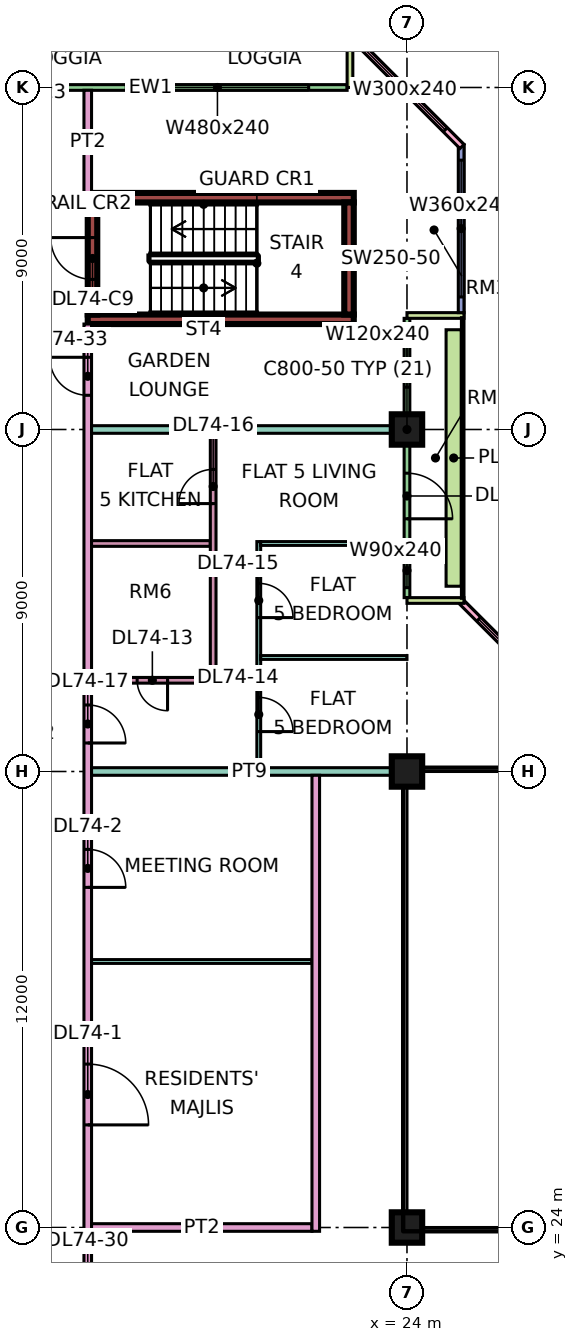
"""IFC4 building model, lengths in metres.
Left out: names, types, materials, properties, quantities, classifications, styles, units other than length and angle.
Written with IfcOpenShell. Run it as: python <this file> out.ifc"""

import sys

from ifc_helpers import new_model, si_unit, direction, frame, frame_2d, origin, origin_2d, place, context, subcontext, project, spatial, rectangle, extrude, element, fill, save


model = new_model("IFC4")
c1 = context("Model", 3, precision=1e-05, world=origin(), true_north=direction((0.0, 1.0)))
c2 = subcontext(c1, "Body", "Model", "MODEL_VIEW")
j1 = project(units=[si_unit("LENGTHUNIT", "METRE"), si_unit("PLANEANGLEUNIT", "RADIAN")], contexts=[c1])
p1 = place(None, origin())
s1 = spatial("IfcSite", under=j1, at=p1, CompositionType="ELEMENT")
p2 = place(p1, origin())
s2 = spatial("IfcBuilding", under=s1, at=p2, CompositionType="ELEMENT")
p3 = place(p2, frame((0.0, 0.0, 314.65)))
s3 = spatial("IfcBuildingStorey", under=s2, at=p3, CompositionType="ELEMENT", Elevation=314.65)
for number, where, z_axis, x_axis in (
    (1, (24.0, 24.0, 0.0), (0.0, 0.0, 1.0), (1.0, 0.0, 0.0)),
    (2, (24.0, 36.0, 0.0), (0.0, 0.0, 1.0), (1.0, 0.0, 0.0)),
    (3, (24.0, 45.0, 0.0), (0.0, 0.0, 1.0), (1.0, 0.0, 0.0)),
):
    element("IfcColumn", number, at=place(p3, frame(where, z_axis=z_axis, x_axis=x_axis)), inside=s3, PredefinedType="COLUMN", context=c2, shape_type="SweptSolid", body=[
        extrude(rectangle(XDim=0.8, YDim=0.8, at=origin_2d()), origin(), (0.0, 0.0, 1.0), 3.75),
    ])
for number, where, z_axis, x_axis in (
    (4, (15.6, 47.9, 0.0), (0.0, 0.0, 1.0), (1.0, 0.0, 0.0)),
    (5, (15.6, 51.1, 0.0), (0.0, 0.0, 1.0), (1.0, 0.0, 0.0)),
):
    element("IfcWall", number, at=place(p3, frame(where, z_axis=z_axis, x_axis=x_axis)), inside=s3, PredefinedType="SHEAR", context=c2, shape_type="SweptSolid", body=[
        extrude(rectangle(XDim=7.0, YDim=0.25, at=frame_2d((3.5, 0.0))), origin(), (0.0, 0.0, 1.0), 3.75),
    ])
p4 = place(p3, frame((15.725, 48.025, 0.0), z_axis=(0.0, 0.0, 1.0), x_axis=(0.0, 1.0, 0.0)))
e6 = element("IfcWall", 6, at=p4, inside=s3, PredefinedType="SHEAR", context=c2, shape_type="SweptSolid", body=[
    extrude(rectangle(XDim=2.95, YDim=0.25, at=frame_2d((1.475, 0.0))), origin(), (0.0, 0.0, 1.0), 3.75),
])
p5 = place(p4, frame((0.925, 0.0, 0.0)))
e7 = element("IfcOpeningElement", 7, at=p5, cuts=e6, PredefinedType="OPENING", context=c2, shape_type="SweptSolid", body=[
    extrude(rectangle(XDim=1.1, YDim=2.2, at=frame_2d((0.55, 1.1))), frame((0.0, 0.135, 0.0), z_axis=(0.0, -1.0, 0.0), x_axis=(1.0, 0.0, 0.0)), (0.0, 0.0, 1.0), 0.27),
])
p6 = place(p3, frame((22.475, 48.025, 0.0), z_axis=(0.0, 0.0, 1.0), x_axis=(0.0, 1.0, 0.0)))
e8 = element("IfcWall", 8, at=p6, inside=s3, PredefinedType="SHEAR", context=c2, shape_type="SweptSolid", body=[
    extrude(rectangle(XDim=2.95, YDim=0.25, at=frame_2d((1.475, 0.0))), origin(), (0.0, 0.0, 1.0), 3.75),
])
p7 = place(p3, frame((28.447, 37.447, 0.0), z_axis=(0.0, 0.0, 1.0), x_axis=(-0.707106781187, 0.707106781187, 0.0)))
e9 = element("IfcWall", 9, at=p7, inside=s3, PredefinedType="SOLIDWALL", context=c2, shape_type="SweptSolid", body=[
    extrude(rectangle(XDim=4.243, YDim=0.15, at=frame_2d((2.121, 0.0))), origin(), (0.0, 0.0, 1.0), 3.35),
])
p8 = place(p7, frame((0.621, 0.0, 0.45)))
e10 = element("IfcOpeningElement", 10, at=p8, cuts=e9, PredefinedType="OPENING", context=c2, shape_type="SweptSolid", body=[
    extrude(rectangle(XDim=3.0, YDim=2.4, at=frame_2d((1.5, 1.2))), frame((0.0, 0.085, 0.0), z_axis=(0.0, -1.0, 0.0), x_axis=(1.0, 0.0, 0.0)), (0.0, 0.0, 1.0), 0.17),
])
p9 = place(p3, frame((24.0, 40.575, 0.0), z_axis=(0.0, 0.0, 1.0), x_axis=(0.0, 1.0, 0.0)))
e11 = element("IfcWall", 11, at=p9, inside=s3, PredefinedType="SOLIDWALL", context=c2, shape_type="SweptSolid", body=[
    extrude(rectangle(XDim=7.35, YDim=0.15, at=frame_2d((3.675, 0.0))), origin(), (0.0, 0.0, 1.0), 3.35),
])
p10 = place(p9, frame((0.262, 0.0, 0.45)))
e12 = element("IfcOpeningElement", 12, at=p10, cuts=e11, PredefinedType="OPENING", context=c2, shape_type="SweptSolid", body=[
    extrude(rectangle(XDim=0.9, YDim=2.4, at=frame_2d((0.45, 1.2))), frame((0.0, 0.085, 0.0), z_axis=(0.0, -1.0, 0.0), x_axis=(1.0, 0.0, 0.0)), (0.0, 0.0, 1.0), 0.17),
])
p11 = place(p9, frame((2.075, 0.0, 0.0)))
e13 = element("IfcOpeningElement", 13, at=p11, cuts=e11, PredefinedType="OPENING", context=c2, shape_type="SweptSolid", body=[
    extrude(rectangle(XDim=1.2, YDim=2.4, at=frame_2d((0.6, 1.2))), frame((0.0, 0.085, 0.0), z_axis=(0.0, -1.0, 0.0), x_axis=(1.0, 0.0, 0.0)), (0.0, 0.0, 1.0), 0.17),
])
p12 = place(p9, frame((5.538, 0.0, 0.45)))
e14 = element("IfcOpeningElement", 14, at=p12, cuts=e11, PredefinedType="OPENING", context=c2, shape_type="SweptSolid", body=[
    extrude(rectangle(XDim=1.2, YDim=2.4, at=frame_2d((0.6, 1.2))), frame((0.0, 0.085, 0.0), z_axis=(0.0, -1.0, 0.0), x_axis=(1.0, 0.0, 0.0)), (0.0, 0.0, 1.0), 0.17),
])
for number, where, z_axis, x_axis in (
    (15, (25.5, 40.5, 0.0), (0.0, 0.0, 1.0), (-1.0, 0.0, 0.0)),
    (16, (25.5, 48.0, 0.0), (0.0, 0.0, 1.0), (-1.0, 0.0, 0.0)),
):
    element("IfcWall", number, at=place(p3, frame(where, z_axis=z_axis, x_axis=x_axis)), inside=s3, PredefinedType="SOLIDWALL", context=c2, shape_type="SweptSolid", body=[
        extrude(rectangle(XDim=1.5, YDim=0.15, at=frame_2d((0.75, 0.0))), origin(), (0.0, 0.0, 1.0), 3.35),
    ])
p13 = place(p3, frame((25.425, 48.075, 0.0), z_axis=(0.0, 0.0, 1.0), x_axis=(0.0, 1.0, 0.0)))
e17 = element("IfcWall", 17, at=p13, inside=s3, PredefinedType="SOLIDWALL", context=c2, shape_type="SweptSolid", body=[
    extrude(rectangle(XDim=4.425, YDim=0.15, at=frame_2d((2.212, 0.0))), origin(), (0.0, 0.0, 1.0), 3.35),
])
p14 = place(p13, frame((0.413, 0.0, 0.45)))
e18 = element("IfcOpeningElement", 18, at=p14, cuts=e17, PredefinedType="OPENING", context=c2, shape_type="SweptSolid", body=[
    extrude(rectangle(XDim=3.6, YDim=2.4, at=frame_2d((1.8, 1.2))), frame((0.0, 0.085, 0.0), z_axis=(0.0, -1.0, 0.0), x_axis=(1.0, 0.0, 0.0)), (0.0, 0.0, 1.0), 0.17),
])
p15 = place(p3, frame((25.447, 52.447, 0.0), z_axis=(0.0, 0.0, 1.0), x_axis=(-0.707106781187, 0.707106781187, 0.0)))
e19 = element("IfcWall", 19, at=p15, inside=s3, PredefinedType="SOLIDWALL", context=c2, shape_type="SweptSolid", body=[
    extrude(rectangle(XDim=4.243, YDim=0.15, at=frame_2d((2.121, 0.0))), origin(), (0.0, 0.0, 1.0), 3.35),
])
p16 = place(p15, frame((0.621, 0.0, 0.45)))
e20 = element("IfcOpeningElement", 20, at=p16, cuts=e19, PredefinedType="OPENING", context=c2, shape_type="SweptSolid", body=[
    extrude(rectangle(XDim=3.0, YDim=2.4, at=frame_2d((1.5, 1.2))), frame((0.0, 0.085, 0.0), z_axis=(0.0, -1.0, 0.0), x_axis=(1.0, 0.0, 0.0)), (0.0, 0.0, 1.0), 0.17),
])
p17 = place(p3, frame((22.425, 54.0, 0.0), z_axis=(0.0, 0.0, 1.0), x_axis=(-1.0, 0.0, 0.0)))
e21 = element("IfcWall", 21, at=p17, inside=s3, PredefinedType="SOLIDWALL", context=c2, shape_type="SweptSolid", body=[
    extrude(rectangle(XDim=10.35, YDim=0.15, at=frame_2d((5.175, 0.0))), origin(), (0.0, 0.0, 1.0), 3.35),
])
p18 = place(p17, frame((1.012, 0.0, 0.45)))
e22 = element("IfcOpeningElement", 22, at=p18, cuts=e21, PredefinedType="OPENING", context=c2, shape_type="SweptSolid", body=[
    extrude(rectangle(XDim=4.8, YDim=2.4, at=frame_2d((2.4, 1.2))), frame((0.0, 0.085, 0.0), z_axis=(0.0, -1.0, 0.0), x_axis=(1.0, 0.0, 0.0)), (0.0, 0.0, 1.0), 0.17),
])
p19 = place(p3, frame((22.5, 55.5, 0.0), z_axis=(0.0, 0.0, 1.0), x_axis=(0.0, -1.0, 0.0)))
e23 = element("IfcWall", 23, at=p19, inside=s3, PredefinedType="SOLIDWALL", context=c2, shape_type="SweptSolid", body=[
    extrude(rectangle(XDim=1.5, YDim=0.15, at=frame_2d((0.75, 0.0))), origin(), (0.0, 0.0, 1.0), 3.35),
])
p20 = place(p3, frame((25.229, 40.875, 0.0), z_axis=(0.0, 0.0, 1.0), x_axis=(0.0, 1.0, 0.0)))
e24 = element("IfcWall", 24, at=p20, inside=s3, PredefinedType="SOLIDWALL", context=c2, shape_type="SweptSolid", body=[
    extrude(rectangle(XDim=6.75, YDim=0.4, at=frame_2d((3.375, 0.0))), origin(), (0.0, 0.0, 1.0), 0.7),
])
p21 = place(p3, frame((15.6, 20.0, 0.0), z_axis=(0.0, 0.0, 1.0), x_axis=(0.0, 1.0, 0.0)))
e25 = element("IfcWall", 25, at=p21, inside=s3, PredefinedType="PARTITIONING", context=c2, shape_type="SweptSolid", body=[
    extrude(rectangle(XDim=27.775, YDim=0.2, at=frame_2d((13.887, 0.0))), origin(), (0.0, 0.0, 1.0), 3.35),
])
p22 = place(p21, frame((6.7, 0.0, 0.0)))
e26 = element("IfcOpeningElement", 26, at=p22, cuts=e25, PredefinedType="OPENING", context=c2, shape_type="SweptSolid", body=[
    extrude(rectangle(XDim=1.6, YDim=2.1, at=frame_2d((0.8, 1.05))), frame((0.0, 0.11, 0.0), z_axis=(0.0, -1.0, 0.0), x_axis=(1.0, 0.0, 0.0)), (0.0, 0.0, 1.0), 0.22),
])
p23 = place(p21, frame((12.95, 0.0, 0.0)))
e27 = element("IfcOpeningElement", 27, at=p23, cuts=e25, PredefinedType="OPENING", context=c2, shape_type="SweptSolid", body=[
    extrude(rectangle(XDim=1.0, YDim=2.1, at=frame_2d((0.5, 1.05))), frame((0.0, 0.11, 0.0), z_axis=(0.0, -1.0, 0.0), x_axis=(1.0, 0.0, 0.0)), (0.0, 0.0, 1.0), 0.22),
])
p24 = place(p21, frame((16.75, 0.0, 0.0)))
e28 = element("IfcOpeningElement", 28, at=p24, cuts=e25, PredefinedType="OPENING", context=c2, shape_type="SweptSolid", body=[
    extrude(rectangle(XDim=1.0, YDim=2.1, at=frame_2d((0.5, 1.05))), frame((0.0, 0.11, 0.0), z_axis=(0.0, -1.0, 0.0), x_axis=(1.0, 0.0, 0.0)), (0.0, 0.0, 1.0), 0.22),
])
p25 = place(p21, frame((1.15, 0.0, 0.0)))
e29 = element("IfcOpeningElement", 29, at=p25, cuts=e25, PredefinedType="OPENING", context=c2, shape_type="SweptSolid", body=[
    extrude(rectangle(XDim=1.8, YDim=2.1, at=frame_2d((0.9, 1.05))), frame((0.0, 0.11, 0.0), z_axis=(0.0, -1.0, 0.0), x_axis=(1.0, 0.0, 0.0)), (0.0, 0.0, 1.0), 0.22),
])
p26 = place(p21, frame((25.9, 0.0, 0.0)))
e30 = element("IfcOpeningElement", 30, at=p26, cuts=e25, PredefinedType="OPENING", context=c2, shape_type="SweptSolid", body=[
    extrude(rectangle(XDim=1.0, YDim=2.1, at=frame_2d((0.5, 1.05))), frame((0.0, 0.11, 0.0), z_axis=(0.0, -1.0, 0.0), x_axis=(1.0, 0.0, 0.0)), (0.0, 0.0, 1.0), 0.22),
])
p27 = place(p3, frame((15.6, 51.225, 0.0), z_axis=(0.0, 0.0, 1.0), x_axis=(0.0, 1.0, 0.0)))
e31 = element("IfcWall", 31, at=p27, inside=s3, PredefinedType="PARTITIONING", context=c2, shape_type="SweptSolid", body=[
    extrude(rectangle(XDim=2.701, YDim=0.2, at=frame_2d((1.351, 0.0))), origin(), (0.0, 0.0, 1.0), 3.35),
])
p28 = place(p3, frame((15.7, 24.0, 0.0), z_axis=(0.0, 0.0, 1.0), x_axis=(1.0, 0.0, 0.0)))
e32 = element("IfcWall", 32, at=p28, inside=s3, PredefinedType="PARTITIONING", context=c2, shape_type="SweptSolid", body=[
    extrude(rectangle(XDim=5.8, YDim=0.2, at=frame_2d((2.9, 0.0))), origin(), (0.0, 0.0, 1.0), 3.35),
])
p29 = place(p3, frame((15.7, 31.0, 0.0), z_axis=(0.0, 0.0, 1.0), x_axis=(1.0, 0.0, 0.0)))
e33 = element("IfcWall", 33, at=p29, inside=s3, PredefinedType="PARTITIONING", context=c2, shape_type="SweptSolid", body=[
    extrude(rectangle(XDim=5.8, YDim=0.1, at=frame_2d((2.9, 0.0))), origin(), (0.0, 0.0, 1.0), 3.35),
])
p30 = place(p3, frame((15.7, 36.0, 0.0), z_axis=(0.0, 0.0, 1.0), x_axis=(1.0, 0.0, 0.0)))
e34 = element("IfcWall", 34, at=p30, inside=s3, PredefinedType="PARTITIONING", context=c2, shape_type="SweptSolid", body=[
    extrude(rectangle(XDim=8.3, YDim=0.2, at=frame_2d((4.15, 0.0))), origin(), (0.0, 0.0, 1.0), 3.35),
])
p31 = place(p3, frame((15.7, 38.4, 0.0), z_axis=(0.0, 0.0, 1.0), x_axis=(1.0, 0.0, 0.0)))
e35 = element("IfcWall", 35, at=p31, inside=s3, PredefinedType="PARTITIONING", context=c2, shape_type="SweptSolid", body=[
    extrude(rectangle(XDim=3.125, YDim=0.15, at=frame_2d((1.562, 0.0))), origin(), (0.0, 0.0, 1.0), 3.35),
])
p32 = place(p31, frame((1.2, 0.0, 0.0)))
e36 = element("IfcOpeningElement", 36, at=p32, cuts=e35, PredefinedType="OPENING", context=c2, shape_type="SweptSolid", body=[
    extrude(rectangle(XDim=0.8, YDim=2.1, at=frame_2d((0.4, 1.05))), frame((0.0, 0.085, 0.0), z_axis=(0.0, -1.0, 0.0), x_axis=(1.0, 0.0, 0.0)), (0.0, 0.0, 1.0), 0.17),
])
p33 = place(p3, frame((15.7, 42.0, 0.0), z_axis=(0.0, 0.0, 1.0), x_axis=(1.0, 0.0, 0.0)))
e37 = element("IfcWall", 37, at=p33, inside=s3, PredefinedType="PARTITIONING", context=c2, shape_type="SweptSolid", body=[
    extrude(rectangle(XDim=3.125, YDim=0.15, at=frame_2d((1.562, 0.0))), origin(), (0.0, 0.0, 1.0), 3.35),
])
p34 = place(p3, frame((15.7, 45.0, 0.0), z_axis=(0.0, 0.0, 1.0), x_axis=(1.0, 0.0, 0.0)))
e38 = element("IfcWall", 38, at=p34, inside=s3, PredefinedType="PARTITIONING", context=c2, shape_type="SweptSolid", body=[
    extrude(rectangle(XDim=8.226, YDim=0.2, at=frame_2d((4.113, 0.0))), origin(), (0.0, 0.0, 1.0), 3.35),
])
p35 = place(p3, frame((18.9, 38.325, 0.0), z_axis=(0.0, 0.0, 1.0), x_axis=(0.0, 1.0, 0.0)))
e39 = element("IfcWall", 39, at=p35, inside=s3, PredefinedType="PARTITIONING", context=c2, shape_type="SweptSolid", body=[
    extrude(rectangle(XDim=6.575, YDim=0.15, at=frame_2d((3.288, 0.0))), origin(), (0.0, 0.0, 1.0), 3.35),
])
p36 = place(p35, frame((4.725, 0.0, 0.0)))
e40 = element("IfcOpeningElement", 40, at=p36, cuts=e39, PredefinedType="OPENING", context=c2, shape_type="SweptSolid", body=[
    extrude(rectangle(XDim=0.9, YDim=2.1, at=frame_2d((0.45, 1.05))), frame((0.0, 0.085, 0.0), z_axis=(0.0, -1.0, 0.0), x_axis=(1.0, 0.0, 0.0)), (0.0, 0.0, 1.0), 0.17),
])
p37 = place(p3, frame((20.1, 36.1, 0.0), z_axis=(0.0, 0.0, 1.0), x_axis=(0.0, 1.0, 0.0)))
e41 = element("IfcWall", 41, at=p37, inside=s3, PredefinedType="PARTITIONING", context=c2, shape_type="SweptSolid", body=[
    extrude(rectangle(XDim=5.95, YDim=0.1, at=frame_2d((2.975, 0.0))), origin(), (0.0, 0.0, 1.0), 3.35),
])
p38 = place(p37, frame((0.95, 0.0, 0.0)))
e42 = element("IfcOpeningElement", 42, at=p38, cuts=e41, PredefinedType="OPENING", context=c2, shape_type="SweptSolid", body=[
    extrude(rectangle(XDim=0.9, YDim=2.1, at=frame_2d((0.45, 1.05))), frame((0.0, 0.06, 0.0), z_axis=(0.0, -1.0, 0.0), x_axis=(1.0, 0.0, 0.0)), (0.0, 0.0, 1.0), 0.12),
])
p39 = place(p37, frame((3.95, 0.0, 0.0)))
e43 = element("IfcOpeningElement", 43, at=p39, cuts=e41, PredefinedType="OPENING", context=c2, shape_type="SweptSolid", body=[
    extrude(rectangle(XDim=0.9, YDim=2.1, at=frame_2d((0.45, 1.05))), frame((0.0, 0.06, 0.0), z_axis=(0.0, -1.0, 0.0), x_axis=(1.0, 0.0, 0.0)), (0.0, 0.0, 1.0), 0.12),
])
p40 = place(p3, frame((20.15, 39.0, 0.0), z_axis=(0.0, 0.0, 1.0), x_axis=(1.0, 0.0, 0.0)))
e44 = element("IfcWall", 44, at=p40, inside=s3, PredefinedType="PARTITIONING", context=c2, shape_type="SweptSolid", body=[
    extrude(rectangle(XDim=3.85, YDim=0.1, at=frame_2d((1.925, 0.0))), origin(), (0.0, 0.0, 1.0), 3.35),
])
p41 = place(p3, frame((20.15, 42.0, 0.0), z_axis=(0.0, 0.0, 1.0), x_axis=(1.0, 0.0, 0.0)))
e45 = element("IfcWall", 45, at=p41, inside=s3, PredefinedType="PARTITIONING", context=c2, shape_type="SweptSolid", body=[
    extrude(rectangle(XDim=3.776, YDim=0.1, at=frame_2d((1.888, 0.0))), origin(), (0.0, 0.0, 1.0), 3.35),
])
p42 = place(p3, frame((21.6, 23.9, 0.0), z_axis=(0.0, 0.0, 1.0), x_axis=(0.0, 1.0, 0.0)))
e46 = element("IfcWall", 46, at=p42, inside=s3, PredefinedType="PARTITIONING", context=c2, shape_type="SweptSolid", body=[
    extrude(rectangle(XDim=12.0, YDim=0.2, at=frame_2d((6.0, 0.0))), origin(), (0.0, 0.0, 1.0), 3.35),
])
p43 = place(p8, origin())
e47 = element("IfcWindow", 47, at=p43, inside=s3, PartitioningType="SINGLE_PANEL", PredefinedType="WINDOW", context=c2, shape_type="SweptSolid", body=[
    extrude(rectangle(XDim=3.0, YDim=2.4, at=frame_2d((1.5, 1.2))), frame((0.0, 0.03, 0.0), z_axis=(0.0, -1.0, 0.0), x_axis=(1.0, 0.0, 0.0)), (0.0, 0.0, 1.0), 0.06),
])
fill(e10, e47)
p44 = place(p10, origin())
e48 = element("IfcWindow", 48, at=p44, inside=s3, PartitioningType="SINGLE_PANEL", PredefinedType="WINDOW", context=c2, shape_type="SweptSolid", body=[
    extrude(rectangle(XDim=0.9, YDim=2.4, at=frame_2d((0.45, 1.2))), frame((0.0, 0.03, 0.0), z_axis=(0.0, -1.0, 0.0), x_axis=(1.0, 0.0, 0.0)), (0.0, 0.0, 1.0), 0.06),
])
fill(e12, e48)
p45 = place(p11, frame((1.2, 0.0, 0.0), z_axis=(0.0, 0.0, 1.0), x_axis=(-1.0, 0.0, 0.0)))
e49 = element("IfcDoor", 49, at=p45, inside=s3, OperationType="DOUBLE_DOOR_SINGLE_SWING", PredefinedType="DOOR", context=c2, shape_type="SweptSolid", body=[
    extrude(rectangle(XDim=1.2, YDim=2.4, at=frame_2d((0.6, 1.2))), frame((0.0, 0.025, 0.0), z_axis=(0.0, -1.0, 0.0), x_axis=(1.0, 0.0, 0.0)), (0.0, 0.0, 1.0), 0.05),
])
fill(e13, e49)
p46 = place(p12, origin())
e50 = element("IfcWindow", 50, at=p46, inside=s3, PartitioningType="SINGLE_PANEL", PredefinedType="WINDOW", context=c2, shape_type="SweptSolid", body=[
    extrude(rectangle(XDim=1.2, YDim=2.4, at=frame_2d((0.6, 1.2))), frame((0.0, 0.03, 0.0), z_axis=(0.0, -1.0, 0.0), x_axis=(1.0, 0.0, 0.0)), (0.0, 0.0, 1.0), 0.06),
])
fill(e14, e50)
p47 = place(p14, origin())
e51 = element("IfcWindow", 51, at=p47, inside=s3, PartitioningType="SINGLE_PANEL", PredefinedType="WINDOW", context=c2, shape_type="SweptSolid", body=[
    extrude(rectangle(XDim=3.6, YDim=2.4, at=frame_2d((1.8, 1.2))), frame((0.0, 0.03, 0.0), z_axis=(0.0, -1.0, 0.0), x_axis=(1.0, 0.0, 0.0)), (0.0, 0.0, 1.0), 0.06),
])
fill(e18, e51)
p48 = place(p16, origin())
e52 = element("IfcWindow", 52, at=p48, inside=s3, PartitioningType="SINGLE_PANEL", PredefinedType="WINDOW", context=c2, shape_type="SweptSolid", body=[
    extrude(rectangle(XDim=3.0, YDim=2.4, at=frame_2d((1.5, 1.2))), frame((0.0, 0.03, 0.0), z_axis=(0.0, -1.0, 0.0), x_axis=(1.0, 0.0, 0.0)), (0.0, 0.0, 1.0), 0.06),
])
fill(e20, e52)
p49 = place(p18, origin())
e53 = element("IfcWindow", 53, at=p49, inside=s3, PartitioningType="SINGLE_PANEL", PredefinedType="WINDOW", context=c2, shape_type="SweptSolid", body=[
    extrude(rectangle(XDim=4.8, YDim=2.4, at=frame_2d((2.4, 1.2))), frame((0.0, 0.03, 0.0), z_axis=(0.0, -1.0, 0.0), x_axis=(1.0, 0.0, 0.0)), (0.0, 0.0, 1.0), 0.06),
])
fill(e22, e53)
p50 = place(p5, frame((1.1, 0.0, 0.0), z_axis=(0.0, 0.0, 1.0), x_axis=(-1.0, 0.0, 0.0)))
e54 = element("IfcDoor", 54, at=p50, inside=s3, OperationType="SINGLE_SWING_RIGHT", PredefinedType="DOOR", context=c2, shape_type="SweptSolid", body=[
    extrude(rectangle(XDim=1.1, YDim=2.2, at=frame_2d((0.55, 1.1))), frame((0.0, 0.025, 0.0), z_axis=(0.0, -1.0, 0.0), x_axis=(1.0, 0.0, 0.0)), (0.0, 0.0, 1.0), 0.05),
])
fill(e7, e54)
p51 = place(p22, frame((1.6, 0.0, 0.0), z_axis=(0.0, 0.0, 1.0), x_axis=(-1.0, 0.0, 0.0)))
e55 = element("IfcDoor", 55, at=p51, inside=s3, OperationType="DOUBLE_DOOR_SINGLE_SWING", PredefinedType="DOOR", context=c2, shape_type="SweptSolid", body=[
    extrude(rectangle(XDim=1.6, YDim=2.1, at=frame_2d((0.8, 1.05))), frame((0.0, 0.025, 0.0), z_axis=(0.0, -1.0, 0.0), x_axis=(1.0, 0.0, 0.0)), (0.0, 0.0, 1.0), 0.05),
])
fill(e26, e55)
p52 = place(p23, frame((1.0, 0.0, 0.0), z_axis=(0.0, 0.0, 1.0), x_axis=(-1.0, 0.0, 0.0)))
e56 = element("IfcDoor", 56, at=p52, inside=s3, OperationType="SINGLE_SWING_LEFT", PredefinedType="DOOR", context=c2, shape_type="SweptSolid", body=[
    extrude(rectangle(XDim=1.0, YDim=2.1, at=frame_2d((0.5, 1.05))), frame((0.0, 0.025, 0.0), z_axis=(0.0, -1.0, 0.0), x_axis=(1.0, 0.0, 0.0)), (0.0, 0.0, 1.0), 0.05),
])
fill(e27, e56)
p53 = place(p32, origin())
e57 = element("IfcDoor", 57, at=p53, inside=s3, OperationType="SINGLE_SWING_RIGHT", PredefinedType="DOOR", context=c2, shape_type="SweptSolid", body=[
    extrude(rectangle(XDim=0.8, YDim=2.1, at=frame_2d((0.4, 1.05))), frame((0.0, 0.025, 0.0), z_axis=(0.0, -1.0, 0.0), x_axis=(1.0, 0.0, 0.0)), (0.0, 0.0, 1.0), 0.05),
])
fill(e36, e57)
p54 = place(p38, frame((0.9, 0.0, 0.0), z_axis=(0.0, 0.0, 1.0), x_axis=(-1.0, 0.0, 0.0)))
e58 = element("IfcDoor", 58, at=p54, inside=s3, OperationType="SINGLE_SWING_LEFT", PredefinedType="DOOR", context=c2, shape_type="SweptSolid", body=[
    extrude(rectangle(XDim=0.9, YDim=2.1, at=frame_2d((0.45, 1.05))), frame((0.0, 0.025, 0.0), z_axis=(0.0, -1.0, 0.0), x_axis=(1.0, 0.0, 0.0)), (0.0, 0.0, 1.0), 0.05),
])
fill(e42, e58)
p55 = place(p39, frame((0.9, 0.0, 0.0), z_axis=(0.0, 0.0, 1.0), x_axis=(-1.0, 0.0, 0.0)))
e59 = element("IfcDoor", 59, at=p55, inside=s3, OperationType="SINGLE_SWING_LEFT", PredefinedType="DOOR", context=c2, shape_type="SweptSolid", body=[
    extrude(rectangle(XDim=0.9, YDim=2.1, at=frame_2d((0.45, 1.05))), frame((0.0, 0.025, 0.0), z_axis=(0.0, -1.0, 0.0), x_axis=(1.0, 0.0, 0.0)), (0.0, 0.0, 1.0), 0.05),
])
fill(e43, e59)
p56 = place(p36, origin())
e60 = element("IfcDoor", 60, at=p56, inside=s3, OperationType="SINGLE_SWING_LEFT", PredefinedType="DOOR", context=c2, shape_type="SweptSolid", body=[
    extrude(rectangle(XDim=0.9, YDim=2.1, at=frame_2d((0.45, 1.05))), frame((0.0, 0.025, 0.0), z_axis=(0.0, -1.0, 0.0), x_axis=(1.0, 0.0, 0.0)), (0.0, 0.0, 1.0), 0.05),
])
fill(e40, e60)
p57 = place(p24, frame((1.0, 0.0, 0.0), z_axis=(0.0, 0.0, 1.0), x_axis=(-1.0, 0.0, 0.0)))
e61 = element("IfcDoor", 61, at=p57, inside=s3, OperationType="SINGLE_SWING_LEFT", PredefinedType="DOOR", context=c2, shape_type="SweptSolid", body=[
    extrude(rectangle(XDim=1.0, YDim=2.1, at=frame_2d((0.5, 1.05))), frame((0.0, 0.025, 0.0), z_axis=(0.0, -1.0, 0.0), x_axis=(1.0, 0.0, 0.0)), (0.0, 0.0, 1.0), 0.05),
])
fill(e28, e61)
p58 = place(p26, frame((1.0, 0.0, 0.0), z_axis=(0.0, 0.0, 1.0), x_axis=(-1.0, 0.0, 0.0)))
e62 = element("IfcDoor", 62, at=p58, inside=s3, OperationType="SINGLE_SWING_RIGHT", PredefinedType="DOOR", context=c2, shape_type="SweptSolid", body=[
    extrude(rectangle(XDim=1.0, YDim=2.1, at=frame_2d((0.5, 1.05))), frame((0.0, 0.025, 0.0), z_axis=(0.0, -1.0, 0.0), x_axis=(1.0, 0.0, 0.0)), (0.0, 0.0, 1.0), 0.05),
])
fill(e30, e62)
save(model, sys.argv[1])
